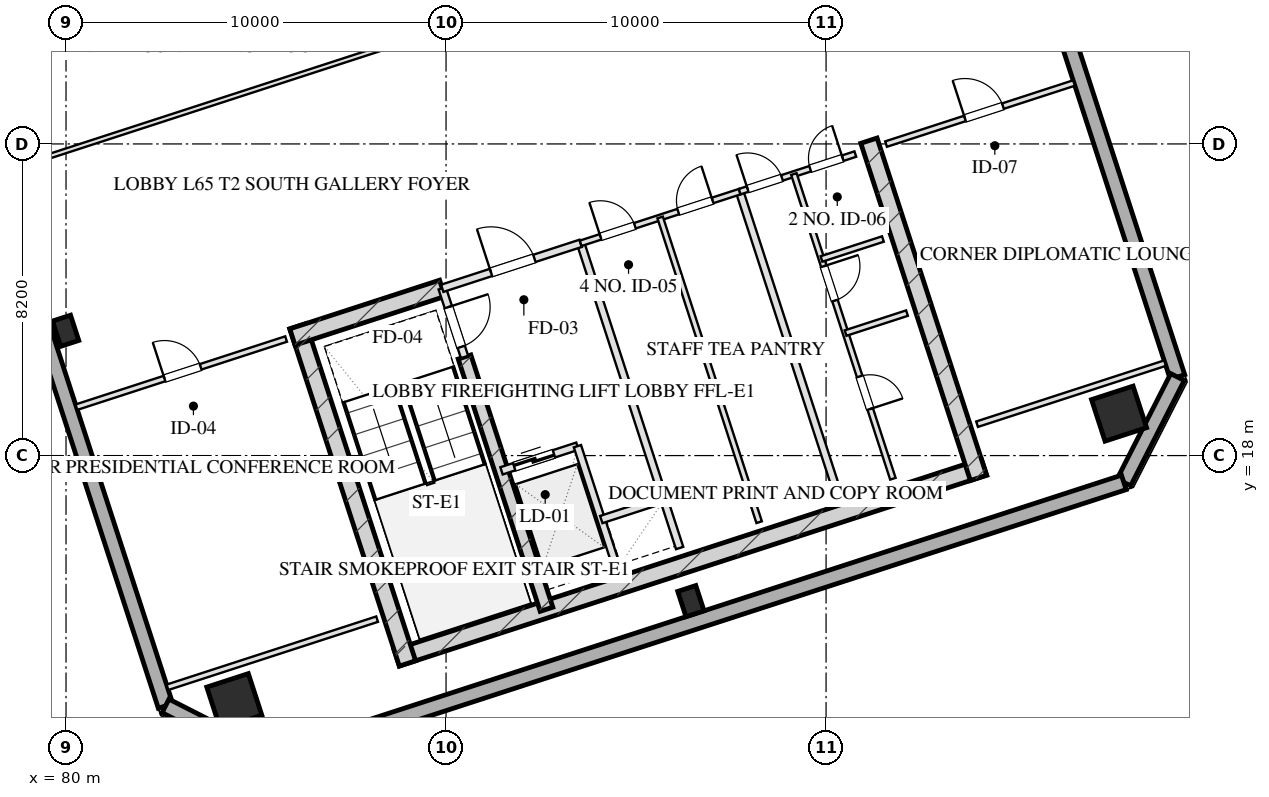
"""IFC4 building model, lengths in metres.
Left out: names, types, materials, properties, quantities, classifications, styles, units other than length and angle.
Written with IfcOpenShell. Run it as: python <this file> out.ifc"""

import sys

from ifc_helpers import new_model, si_unit, direction, frame, frame_2d, origin, origin_2d, place, context, subcontext, project, spatial, rectangle, hollow_rectangle, extrude, element, fill, save


model = new_model("IFC4")
c1 = context("Model", 3, precision=1e-05, world=origin(), true_north=direction((0.0, 1.0)))
c2 = subcontext(c1, "Body", "Model", "MODEL_VIEW")
j1 = project(units=[si_unit("LENGTHUNIT", "METRE"), si_unit("PLANEANGLEUNIT", "RADIAN")], contexts=[c1])
p1 = place(None, origin())
s1 = spatial("IfcSite", under=j1, at=p1, CompositionType="ELEMENT")
p2 = place(p1, origin())
s2 = spatial("IfcBuilding", under=s1, at=p2, CompositionType="ELEMENT")
p3 = place(p2, frame((0.0, 0.0, 240.8)))
s3 = spatial("IfcBuildingStorey", under=s2, at=p3, CompositionType="ELEMENT", Elevation=240.8)
p4 = place(p3, frame((88.701, 12.675, 0.0), z_axis=(0.0, 0.0, 1.0), x_axis=(0.95105824505, 0.309011673763, 0.0)))
e1 = element("IfcWall", 1, at=p4, inside=s3, PredefinedType="SHEAR", context=c2, shape_type="SweptSolid", body=[
    extrude(rectangle(XDim=16.25, YDim=0.45, at=frame_2d((8.125, 0.0))), origin(), (0.0, 0.0, 1.0), 3.2),
])
for number, where, z_axis, x_axis in (
    (2, (86.102, 21.404, 0.0), (0.0, 0.0, 1.0), (0.309, -0.951, 0.0)),
    (3, (101.128, 26.286, 0.0), (0.0, 0.0, 1.0), (0.309, -0.951, 0.0)),
):
    element("IfcWall", number, at=place(p3, frame(where, z_axis=z_axis, x_axis=x_axis)), inside=s3, PredefinedType="SHEAR", context=c2, shape_type="SweptSolid", body=[
        extrude(rectangle(XDim=9.33, YDim=0.45, at=frame_2d((4.665, 0.0))), origin(), (0.0, 0.0, 1.0), 3.2),
    ])
p5 = place(p3, frame((90.486, 20.594, 0.0), z_axis=(0.0, 0.0, 1.0), x_axis=(0.309020428229, -0.951055400562, 0.0)))
e4 = element("IfcWall", 4, at=p5, inside=s3, PredefinedType="SHEAR", context=c2, shape_type="SweptSolid", body=[
    extrude(rectangle(XDim=6.98, YDim=0.35, at=frame_2d((3.49, 0.0))), origin(), (0.0, 0.0, 1.0), 3.2),
])
p6 = place(p3, frame((85.957, 21.12, 0.0), z_axis=(0.0, 0.0, 1.0), x_axis=(0.951064796122, 0.308991510526, 0.0)))
e5 = element("IfcWall", 5, at=p6, inside=s3, PredefinedType="SHEAR", context=c2, shape_type="SweptSolid", body=[
    extrude(rectangle(XDim=4.145, YDim=0.45, at=frame_2d((2.073, 0.0))), origin(), (0.0, 0.0, 1.0), 3.2),
])
for number, where, z_axis, x_axis in (
    (6, (84.428, 11.539, 0.0), (0.0, 0.0, 1.0), (0.951, 0.309, 0.0)),
    (7, (107.71, 19.104, 0.0), (0.0, 0.0, 1.0), (0.951, 0.309, 0.0)),
):
    element("IfcColumn", number, at=place(p3, frame(where, z_axis=z_axis, x_axis=x_axis)), inside=s3, PredefinedType="COLUMN", context=c2, shape_type="SweptSolid", body=[
        extrude(hollow_rectangle(XDim=1.15, YDim=1.15, WallThickness=0.04, at=origin_2d()), origin(), (0.0, 0.0, 1.0), 3.201),
    ])
for number, where, z_axis, x_axis in (
    (8, (79.99, 21.284, 0.0), (0.0, 0.0, 1.0), (0.951, 0.309, 0.0)),
    (9, (96.443, 14.17, 0.0), (0.0, 0.0, 1.0), (0.951, 0.309, 0.0)),
):
    element("IfcColumn", number, at=place(p3, frame(where, z_axis=z_axis, x_axis=x_axis)), inside=s3, PredefinedType="COLUMN", context=c2, shape_type="SweptSolid", body=[
        extrude(hollow_rectangle(XDim=0.5, YDim=0.7, WallThickness=0.025, at=origin_2d()), origin(), (0.0, 0.0, 1.0), 3.201),
    ])
p7 = place(p3, frame((82.618, 11.414, 0.0), z_axis=(0.0, 0.0, 1.0), x_axis=(-0.309016491071, 0.951056679828, 0.0)))
e10 = element("IfcWall", 10, at=p7, inside=s3, PredefinedType="SOLIDWALL", context=c2, shape_type="SweptSolid", body=[
    extrude(rectangle(XDim=38.4, YDim=0.4, at=frame_2d((19.2, 0.0))), origin(), (0.0, 0.0, 1.0), 2.36),
])
p8 = place(p7, frame((11.825, 0.0, 0.75)))
e11 = element("IfcOpeningElement", 11, at=p8, cuts=e10, PredefinedType="OPENING", context=c2, shape_type="SweptSolid", body=[
    extrude(rectangle(XDim=1.95, YDim=1.21, at=frame_2d((0.975, 0.605))), frame((0.0, 0.21, 0.0), z_axis=(0.0, -1.0, 0.0), x_axis=(1.0, 0.0, 0.0)), (0.0, 0.0, 1.0), 0.42),
])
p9 = place(p7, frame((15.625, 0.0, 0.75)))
e12 = element("IfcOpeningElement", 12, at=p9, cuts=e10, PredefinedType="OPENING", context=c2, shape_type="SweptSolid", body=[
    extrude(rectangle(XDim=1.95, YDim=1.21, at=frame_2d((0.975, 0.605))), frame((0.0, 0.21, 0.0), z_axis=(0.0, -1.0, 0.0), x_axis=(1.0, 0.0, 0.0)), (0.0, 0.0, 1.0), 0.42),
])
p10 = place(p7, frame((21.5, 0.0, 0.0)))
e13 = element("IfcOpeningElement", 13, at=p10, cuts=e10, PredefinedType="OPENING", context=c2, shape_type="SweptSolid", body=[
    extrude(rectangle(XDim=1.1, YDim=2.15, at=frame_2d((0.55, 1.075))), frame((0.0, 0.21, 0.0), z_axis=(0.0, -1.0, 0.0), x_axis=(1.0, 0.0, 0.0)), (0.0, 0.0, 1.0), 0.42),
])
p11 = place(p3, frame((97.382, 56.586, 0.0), z_axis=(0.0, 0.0, 1.0), x_axis=(0.309016491071, -0.951056679828, 0.0)))
e14 = element("IfcWall", 14, at=p11, inside=s3, PredefinedType="SOLIDWALL", context=c2, shape_type="SweptSolid", body=[
    extrude(rectangle(XDim=38.4, YDim=0.4, at=frame_2d((19.2, 0.0))), origin(), (0.0, 0.0, 1.0), 2.36),
])
p12 = place(p11, frame((24.625, 0.0, 0.75)))
e15 = element("IfcOpeningElement", 15, at=p12, cuts=e14, PredefinedType="OPENING", context=c2, shape_type="SweptSolid", body=[
    extrude(rectangle(XDim=1.95, YDim=1.21, at=frame_2d((0.975, 0.605))), frame((0.0, 0.21, 0.0), z_axis=(0.0, -1.0, 0.0), x_axis=(1.0, 0.0, 0.0)), (0.0, 0.0, 1.0), 0.42),
])
p13 = place(p11, frame((20.825, 0.0, 0.75)))
e16 = element("IfcOpeningElement", 16, at=p13, cuts=e14, PredefinedType="OPENING", context=c2, shape_type="SweptSolid", body=[
    extrude(rectangle(XDim=1.95, YDim=1.21, at=frame_2d((0.975, 0.605))), frame((0.0, 0.21, 0.0), z_axis=(0.0, -1.0, 0.0), x_axis=(1.0, 0.0, 0.0)), (0.0, 0.0, 1.0), 0.42),
])
p14 = place(p11, frame((15.8, 0.0, 0.0)))
e17 = element("IfcOpeningElement", 17, at=p14, cuts=e14, PredefinedType="OPENING", context=c2, shape_type="SweptSolid", body=[
    extrude(rectangle(XDim=1.1, YDim=2.15, at=frame_2d((0.55, 1.075))), frame((0.0, 0.21, 0.0), z_axis=(0.0, -1.0, 0.0), x_axis=(1.0, 0.0, 0.0)), (0.0, 0.0, 1.0), 0.42),
])
p15 = place(p3, frame((109.248, 20.066, 0.0), z_axis=(0.0, 0.0, 1.0), x_axis=(-0.453949291228, -0.891027519774, 0.0)))
e18 = element("IfcWall", 18, at=p15, inside=s3, PredefinedType="SOLIDWALL", context=c2, shape_type="SweptSolid", body=[
    extrude(rectangle(XDim=3.111, YDim=0.4, at=frame_2d((1.556, 0.0))), origin(), (0.0, 0.0, 1.0), 2.36),
])
p16 = place(p3, frame((107.835, 17.294, 0.0), z_axis=(0.0, 0.0, 1.0), x_axis=(-0.951058012937, -0.309012388148, 0.0)))
e19 = element("IfcWall", 19, at=p16, inside=s3, PredefinedType="SOLIDWALL", context=c2, shape_type="SweptSolid", body=[
    extrude(rectangle(XDim=23.6, YDim=0.4, at=frame_2d((11.8, 0.0))), origin(), (0.0, 0.0, 1.0), 2.36),
])
p17 = place(p3, frame((85.39, 10.001, 0.0), z_axis=(0.0, 0.0, 1.0), x_axis=(-0.890979603174, 0.454043331334, 0.0)))
e20 = element("IfcWall", 20, at=p17, inside=s3, PredefinedType="SOLIDWALL", context=c2, shape_type="SweptSolid", body=[
    extrude(rectangle(XDim=3.111, YDim=0.4, at=frame_2d((1.556, 0.0))), origin(), (0.0, 0.0, 1.0), 2.36),
])
p18 = place(p3, frame((89.899, 22.401, 0.0), z_axis=(0.0, 0.0, 1.0), x_axis=(0.308932062672, -0.951084108086, 0.0)))
e21 = element("IfcWall", 21, at=p18, inside=s3, PredefinedType="PARTITIONING", context=c2, shape_type="SweptSolid", body=[
    extrude(rectangle(XDim=1.9, YDim=0.2, at=frame_2d((0.95, 0.0))), origin(), (0.0, 0.0, 1.0), 2.925),
])
p19 = place(p18, frame((0.52, 0.0, 0.0)))
e22 = element("IfcOpeningElement", 22, at=p19, cuts=e21, PredefinedType="OPENING", context=c2, shape_type="SweptSolid", body=[
    extrude(rectangle(XDim=1.1, YDim=2.05, at=frame_2d((0.55, 1.025))), frame((0.0, 0.11, 0.0), z_axis=(0.0, -1.0, 0.0), x_axis=(1.0, 0.0, 0.0)), (0.0, 0.0, 1.0), 0.22),
])
p20 = place(p3, frame((93.542, 23.585, 0.0), z_axis=(0.0, 0.0, 1.0), x_axis=(0.309042196757, -0.951048327176, 0.0)))
e23 = element("IfcWall", 23, at=p20, inside=s3, PredefinedType="PARTITIONING", context=c2, shape_type="SweptSolid", body=[
    extrude(rectangle(XDim=8.43, YDim=0.2, at=frame_2d((4.215, 0.0))), origin(), (0.0, 0.0, 1.0), 2.925),
])
p21 = place(p3, frame((89.899, 22.401, 0.0), z_axis=(0.0, 0.0, 1.0), x_axis=(0.951046716504, 0.309047153403, 0.0)))
e24 = element("IfcWall", 24, at=p21, inside=s3, PredefinedType="PARTITIONING", context=c2, shape_type="SweptSolid", body=[
    extrude(rectangle(XDim=3.83, YDim=0.2, at=frame_2d((1.915, 0.0))), origin(), (0.0, 0.0, 1.0), 2.925),
])
p22 = place(p21, frame((1.35, 0.0, 0.0)))
e25 = element("IfcOpeningElement", 25, at=p22, cuts=e24, PredefinedType="OPENING", context=c2, shape_type="SweptSolid", body=[
    extrude(rectangle(XDim=1.2, YDim=2.05, at=frame_2d((0.6, 1.025))), frame((0.0, 0.11, 0.0), z_axis=(0.0, -1.0, 0.0), x_axis=(1.0, 0.0, 0.0)), (0.0, 0.0, 1.0), 0.22),
])
p23 = place(p3, frame((91.46, 17.598, 0.0), z_axis=(0.0, 0.0, 1.0), x_axis=(0.951062257173, 0.308999325213, 0.0)))
e26 = element("IfcWall", 26, at=p23, inside=s3, PredefinedType="PARTITIONING", context=c2, shape_type="SweptSolid", body=[
    extrude(rectangle(XDim=2.1, YDim=0.2, at=frame_2d((1.05, 0.0))), origin(), (0.0, 0.0, 1.0), 2.925),
])
p24 = place(p23, frame((0.35, 0.0, 0.0)))
e27 = element("IfcOpeningElement", 27, at=p24, cuts=e26, PredefinedType="OPENING", context=c2, shape_type="SweptSolid", body=[
    extrude(rectangle(XDim=1.1, YDim=2.05, at=frame_2d((0.55, 1.025))), frame((0.0, 0.11, 0.0), z_axis=(0.0, -1.0, 0.0), x_axis=(1.0, 0.0, 0.0)), (0.0, 0.0, 1.0), 0.22),
])
p25 = place(p3, frame((93.457, 18.247, 0.0), z_axis=(0.0, 0.0, 1.0), x_axis=(0.3089935693, -0.951064127245, 0.0)))
e28 = element("IfcWall", 28, at=p25, inside=s3, PredefinedType="PARTITIONING", context=c2, shape_type="SweptSolid", body=[
    extrude(rectangle(XDim=3.7, YDim=0.2, at=frame_2d((1.85, 0.0))), origin(), (0.0, 0.0, 1.0), 2.925),
])
p26 = place(p3, frame((94.084, 16.317, 0.0), z_axis=(0.0, 0.0, 1.0), x_axis=(0.951041328149, 0.309063734775, 0.0)))
e29 = element("IfcWall", 29, at=p26, inside=s3, PredefinedType="PARTITIONING", context=c2, shape_type="SweptSolid", body=[
    extrude(rectangle(XDim=1.73, YDim=0.2, at=frame_2d((0.865, 0.0))), origin(), (0.0, 0.0, 1.0), 2.925),
])
p27 = place(p3, frame((97.727, 24.944, 0.0), z_axis=(0.0, 0.0, 1.0), x_axis=(0.309016001439, -0.951056838919, 0.0)))
e30 = element("IfcWall", 30, at=p27, inside=s3, PredefinedType="PARTITIONING", context=c2, shape_type="SweptSolid", body=[
    extrude(rectangle(XDim=8.43, YDim=0.2, at=frame_2d((4.215, 0.0))), origin(), (0.0, 0.0, 1.0), 2.925),
])
p28 = place(p3, frame((93.542, 23.585, 0.0), z_axis=(0.0, 0.0, 1.0), x_axis=(0.951063829732, 0.308994485023, 0.0)))
e31 = element("IfcWall", 31, at=p28, inside=s3, PredefinedType="PARTITIONING", context=c2, shape_type="SweptSolid", body=[
    extrude(rectangle(XDim=4.4, YDim=0.15, at=frame_2d((2.2, 0.0))), origin(), (0.0, 0.0, 1.0), 2.925),
])
p29 = place(p28, frame((0.55, 0.0, 0.0)))
e32 = element("IfcOpeningElement", 32, at=p29, cuts=e31, PredefinedType="OPENING", context=c2, shape_type="SweptSolid", body=[
    extrude(rectangle(XDim=0.95, YDim=2.05, at=frame_2d((0.475, 1.025))), frame((0.0, 0.085, 0.0), z_axis=(0.0, -1.0, 0.0), x_axis=(1.0, 0.0, 0.0)), (0.0, 0.0, 1.0), 0.17),
])
p30 = place(p28, frame((2.7, 0.0, 0.0)))
e33 = element("IfcOpeningElement", 33, at=p30, cuts=e31, PredefinedType="OPENING", context=c2, shape_type="SweptSolid", body=[
    extrude(rectangle(XDim=0.95, YDim=2.05, at=frame_2d((0.475, 1.025))), frame((0.0, 0.085, 0.0), z_axis=(0.0, -1.0, 0.0), x_axis=(1.0, 0.0, 0.0)), (0.0, 0.0, 1.0), 0.17),
])
p31 = place(p3, frame((95.634, 24.265, 0.0), z_axis=(0.0, 0.0, 1.0), x_axis=(0.309007490203, -0.951059604335, 0.0)))
e34 = element("IfcWall", 34, at=p31, inside=s3, PredefinedType="PARTITIONING", context=c2, shape_type="SweptSolid", body=[
    extrude(rectangle(XDim=8.43, YDim=0.15, at=frame_2d((4.215, 0.0))), origin(), (0.0, 0.0, 1.0), 2.925),
])
p32 = place(p3, frame((97.727, 24.944, 0.0), z_axis=(0.0, 0.0, 1.0), x_axis=(0.951036872128, 0.309077446369, 0.0)))
e35 = element("IfcWall", 35, at=p32, inside=s3, PredefinedType="PARTITIONING", context=c2, shape_type="SweptSolid", body=[
    extrude(rectangle(XDim=3.2, YDim=0.15, at=frame_2d((1.6, 0.0))), origin(), (0.0, 0.0, 1.0), 2.925),
])
p33 = place(p32, frame((0.22, 0.0, 0.0)))
e36 = element("IfcOpeningElement", 36, at=p33, cuts=e35, PredefinedType="OPENING", context=c2, shape_type="SweptSolid", body=[
    extrude(rectangle(XDim=0.95, YDim=2.05, at=frame_2d((0.475, 1.025))), frame((0.0, 0.085, 0.0), z_axis=(0.0, -1.0, 0.0), x_axis=(1.0, 0.0, 0.0)), (0.0, 0.0, 1.0), 0.17),
])
p34 = place(p32, frame((1.95, 0.0, 0.0)))
e37 = element("IfcOpeningElement", 37, at=p34, cuts=e35, PredefinedType="OPENING", context=c2, shape_type="SweptSolid", body=[
    extrude(rectangle(XDim=0.9, YDim=2.05, at=frame_2d((0.45, 1.025))), frame((0.0, 0.085, 0.0), z_axis=(0.0, -1.0, 0.0), x_axis=(1.0, 0.0, 0.0)), (0.0, 0.0, 1.0), 0.17),
])
p35 = place(p3, frame((99.153, 25.408, 0.0), z_axis=(0.0, 0.0, 1.0), x_axis=(0.309016001439, -0.951056838919, 0.0)))
e38 = element("IfcWall", 38, at=p35, inside=s3, PredefinedType="PARTITIONING", context=c2, shape_type="SweptSolid", body=[
    extrude(rectangle(XDim=8.43, YDim=0.15, at=frame_2d((4.215, 0.0))), origin(), (0.0, 0.0, 1.0), 2.925),
])
p36 = place(p35, frame((2.55, 0.0, 0.0)))
e39 = element("IfcOpeningElement", 39, at=p36, cuts=e38, PredefinedType="OPENING", context=c2, shape_type="SweptSolid", body=[
    extrude(rectangle(XDim=0.95, YDim=2.05, at=frame_2d((0.475, 1.025))), frame((0.0, 0.085, 0.0), z_axis=(0.0, -1.0, 0.0), x_axis=(1.0, 0.0, 0.0)), (0.0, 0.0, 1.0), 0.17),
])
p37 = place(p35, frame((5.6, 0.0, 0.0)))
e40 = element("IfcOpeningElement", 40, at=p37, cuts=e38, PredefinedType="OPENING", context=c2, shape_type="SweptSolid", body=[
    extrude(rectangle(XDim=0.9, YDim=2.05, at=frame_2d((0.45, 1.025))), frame((0.0, 0.085, 0.0), z_axis=(0.0, -1.0, 0.0), x_axis=(1.0, 0.0, 0.0)), (0.0, 0.0, 1.0), 0.17),
])
for number, where, z_axis, x_axis in (
    (41, (100.513, 21.223, 0.0), (0.0, 0.0, 1.0), (0.951, 0.309, 0.0)),
    (42, (99.879, 23.173, 0.0), (0.0, 0.0, 1.0), (0.951, 0.309, 0.0)),
):
    element("IfcWall", number, at=place(p3, frame(where, z_axis=z_axis, x_axis=x_axis)), inside=s3, PredefinedType="PARTITIONING", context=c2, shape_type="SweptSolid", body=[
        extrude(rectangle(XDim=1.7, YDim=0.15, at=frame_2d((0.85, 0.0))), origin(), (0.0, 0.0, 1.0), 2.925),
    ])
p38 = place(p3, frame((82.669, 11.903, 0.0), z_axis=(0.0, 0.0, 1.0), x_axis=(0.951059431056, 0.309008023519, 0.0)))
e43 = element("IfcWall", 43, at=p38, inside=s3, PredefinedType="PARTITIONING", context=c2, shape_type="SweptSolid", body=[
    extrude(rectangle(XDim=5.8, YDim=0.15, at=frame_2d((2.9, 0.0))), origin(), (0.0, 0.0, 1.0), 2.925),
])
p39 = place(p3, frame((80.275, 19.274, 0.0), z_axis=(0.0, 0.0, 1.0), x_axis=(0.951059431056, 0.309008023519, 0.0)))
e44 = element("IfcWall", 44, at=p39, inside=s3, PredefinedType="PARTITIONING", context=c2, shape_type="SweptSolid", body=[
    extrude(rectangle(XDim=5.8, YDim=0.15, at=frame_2d((2.9, 0.0))), origin(), (0.0, 0.0, 1.0), 2.925),
])
p40 = place(p39, frame((2.436, 0.0, 0.0)))
e45 = element("IfcOpeningElement", 45, at=p40, cuts=e44, PredefinedType="OPENING", context=c2, shape_type="SweptSolid", body=[
    extrude(rectangle(XDim=1.0, YDim=2.05, at=frame_2d((0.5, 1.025))), frame((0.0, 0.085, 0.0), z_axis=(0.0, -1.0, 0.0), x_axis=(1.0, 0.0, 0.0)), (0.0, 0.0, 1.0), 0.17),
])
p41 = place(p3, frame((103.973, 18.825, 0.0), z_axis=(0.0, 0.0, 1.0), x_axis=(0.951055112834, 0.309021313752, 0.0)))
e46 = element("IfcWall", 46, at=p41, inside=s3, PredefinedType="PARTITIONING", context=c2, shape_type="SweptSolid", body=[
    extrude(rectangle(XDim=5.2, YDim=0.15, at=frame_2d((2.6, 0.0))), origin(), (0.0, 0.0, 1.0), 2.925),
])
p42 = place(p3, frame((101.578, 26.196, 0.0), z_axis=(0.0, 0.0, 1.0), x_axis=(0.951064427824, 0.308992644131, 0.0)))
e47 = element("IfcWall", 47, at=p42, inside=s3, PredefinedType="PARTITIONING", context=c2, shape_type="SweptSolid", body=[
    extrude(rectangle(XDim=5.2, YDim=0.15, at=frame_2d((2.6, 0.0))), origin(), (0.0, 0.0, 1.0), 2.925),
])
p43 = place(p42, frame((2.184, 0.0, 0.0)))
e48 = element("IfcOpeningElement", 48, at=p43, cuts=e47, PredefinedType="OPENING", context=c2, shape_type="SweptSolid", body=[
    extrude(rectangle(XDim=1.05, YDim=2.05, at=frame_2d((0.525, 1.025))), frame((0.0, 0.085, 0.0), z_axis=(0.0, -1.0, 0.0), x_axis=(1.0, 0.0, 0.0)), (0.0, 0.0, 1.0), 0.17),
])
p44 = place(p3, frame((78.266, 25.456, 0.0), z_axis=(0.0, 0.0, 1.0), x_axis=(0.951056072529, 0.309018360142, 0.0)))
e49 = element("IfcWall", 49, at=p44, inside=s3, PredefinedType="PARTITIONING", context=c2, shape_type="SweptSolid", body=[
    extrude(rectangle(XDim=10.925, YDim=0.12, at=frame_2d((5.462, 0.0))), origin(), (0.0, 0.0, 1.0), 2.925),
])
p45 = place(p19, origin())
e50 = element("IfcDoor", 50, at=p45, inside=s3, OperationType="SINGLE_SWING_LEFT", PredefinedType="DOOR", context=c2, shape_type="SweptSolid", body=[
    extrude(rectangle(XDim=1.1, YDim=2.05, at=frame_2d((0.55, 1.025))), frame((0.0, 0.025, 0.0), z_axis=(0.0, -1.0, 0.0), x_axis=(1.0, 0.0, 0.0)), (0.0, 0.0, 1.0), 0.05),
])
fill(e22, e50)
p46 = place(p22, origin())
e51 = element("IfcDoor", 51, at=p46, inside=s3, OperationType="SINGLE_SWING_LEFT", PredefinedType="DOOR", context=c2, shape_type="SweptSolid", body=[
    extrude(rectangle(XDim=1.2, YDim=2.05, at=frame_2d((0.6, 1.025))), frame((0.0, 0.025, 0.0), z_axis=(0.0, -1.0, 0.0), x_axis=(1.0, 0.0, 0.0)), (0.0, 0.0, 1.0), 0.05),
])
fill(e25, e51)
p47 = place(p24, origin())
e52 = element("IfcDoor", 52, at=p47, inside=s3, OperationType="DOUBLE_DOOR_SLIDING", PredefinedType="DOOR", context=c2, shape_type="SweptSolid", body=[
    extrude(rectangle(XDim=1.1, YDim=2.05, at=frame_2d((0.55, 1.025))), frame((0.0, 0.025, 0.0), z_axis=(0.0, -1.0, 0.0), x_axis=(1.0, 0.0, 0.0)), (0.0, 0.0, 1.0), 0.05),
])
fill(e27, e52)
p48 = place(p29, origin())
e53 = element("IfcDoor", 53, at=p48, inside=s3, OperationType="SINGLE_SWING_LEFT", PredefinedType="DOOR", context=c2, shape_type="SweptSolid", body=[
    extrude(rectangle(XDim=0.95, YDim=2.05, at=frame_2d((0.475, 1.025))), frame((0.0, 0.025, 0.0), z_axis=(0.0, -1.0, 0.0), x_axis=(1.0, 0.0, 0.0)), (0.0, 0.0, 1.0), 0.05),
])
fill(e32, e53)
p49 = place(p30, origin())
e54 = element("IfcDoor", 54, at=p49, inside=s3, OperationType="SINGLE_SWING_RIGHT", PredefinedType="DOOR", context=c2, shape_type="SweptSolid", body=[
    extrude(rectangle(XDim=0.95, YDim=2.05, at=frame_2d((0.475, 1.025))), frame((0.0, 0.025, 0.0), z_axis=(0.0, -1.0, 0.0), x_axis=(1.0, 0.0, 0.0)), (0.0, 0.0, 1.0), 0.05),
])
fill(e33, e54)
p50 = place(p33, origin())
e55 = element("IfcDoor", 55, at=p50, inside=s3, OperationType="SINGLE_SWING_LEFT", PredefinedType="DOOR", context=c2, shape_type="SweptSolid", body=[
    extrude(rectangle(XDim=0.95, YDim=2.05, at=frame_2d((0.475, 1.025))), frame((0.0, 0.025, 0.0), z_axis=(0.0, -1.0, 0.0), x_axis=(1.0, 0.0, 0.0)), (0.0, 0.0, 1.0), 0.05),
])
fill(e36, e55)
p51 = place(p34, origin())
e56 = element("IfcDoor", 56, at=p51, inside=s3, OperationType="SINGLE_SWING_RIGHT", PredefinedType="DOOR", context=c2, shape_type="SweptSolid", body=[
    extrude(rectangle(XDim=0.9, YDim=2.05, at=frame_2d((0.45, 1.025))), frame((0.0, 0.025, 0.0), z_axis=(0.0, -1.0, 0.0), x_axis=(1.0, 0.0, 0.0)), (0.0, 0.0, 1.0), 0.05),
])
fill(e37, e56)
p52 = place(p36, origin())
e57 = element("IfcDoor", 57, at=p52, inside=s3, OperationType="SINGLE_SWING_LEFT", PredefinedType="DOOR", context=c2, shape_type="SweptSolid", body=[
    extrude(rectangle(XDim=0.95, YDim=2.05, at=frame_2d((0.475, 1.025))), frame((0.0, 0.025, 0.0), z_axis=(0.0, -1.0, 0.0), x_axis=(1.0, 0.0, 0.0)), (0.0, 0.0, 1.0), 0.05),
])
fill(e39, e57)
p53 = place(p37, origin())
e58 = element("IfcDoor", 58, at=p53, inside=s3, OperationType="SINGLE_SWING_RIGHT", PredefinedType="DOOR", context=c2, shape_type="SweptSolid", body=[
    extrude(rectangle(XDim=0.9, YDim=2.05, at=frame_2d((0.45, 1.025))), frame((0.0, 0.025, 0.0), z_axis=(0.0, -1.0, 0.0), x_axis=(1.0, 0.0, 0.0)), (0.0, 0.0, 1.0), 0.05),
])
fill(e40, e58)
p54 = place(p40, origin())
e59 = element("IfcDoor", 59, at=p54, inside=s3, OperationType="SINGLE_SWING_LEFT", PredefinedType="DOOR", context=c2, shape_type="SweptSolid", body=[
    extrude(rectangle(XDim=1.0, YDim=2.05, at=frame_2d((0.5, 1.025))), frame((0.0, 0.025, 0.0), z_axis=(0.0, -1.0, 0.0), x_axis=(1.0, 0.0, 0.0)), (0.0, 0.0, 1.0), 0.05),
])
fill(e45, e59)
p55 = place(p43, origin())
e60 = element("IfcDoor", 60, at=p55, inside=s3, OperationType="SINGLE_SWING_LEFT", PredefinedType="DOOR", context=c2, shape_type="SweptSolid", body=[
    extrude(rectangle(XDim=1.05, YDim=2.05, at=frame_2d((0.525, 1.025))), frame((0.0, 0.025, 0.0), z_axis=(0.0, -1.0, 0.0), x_axis=(1.0, 0.0, 0.0)), (0.0, 0.0, 1.0), 0.05),
])
fill(e48, e60)
save(model, sys.argv[1])
